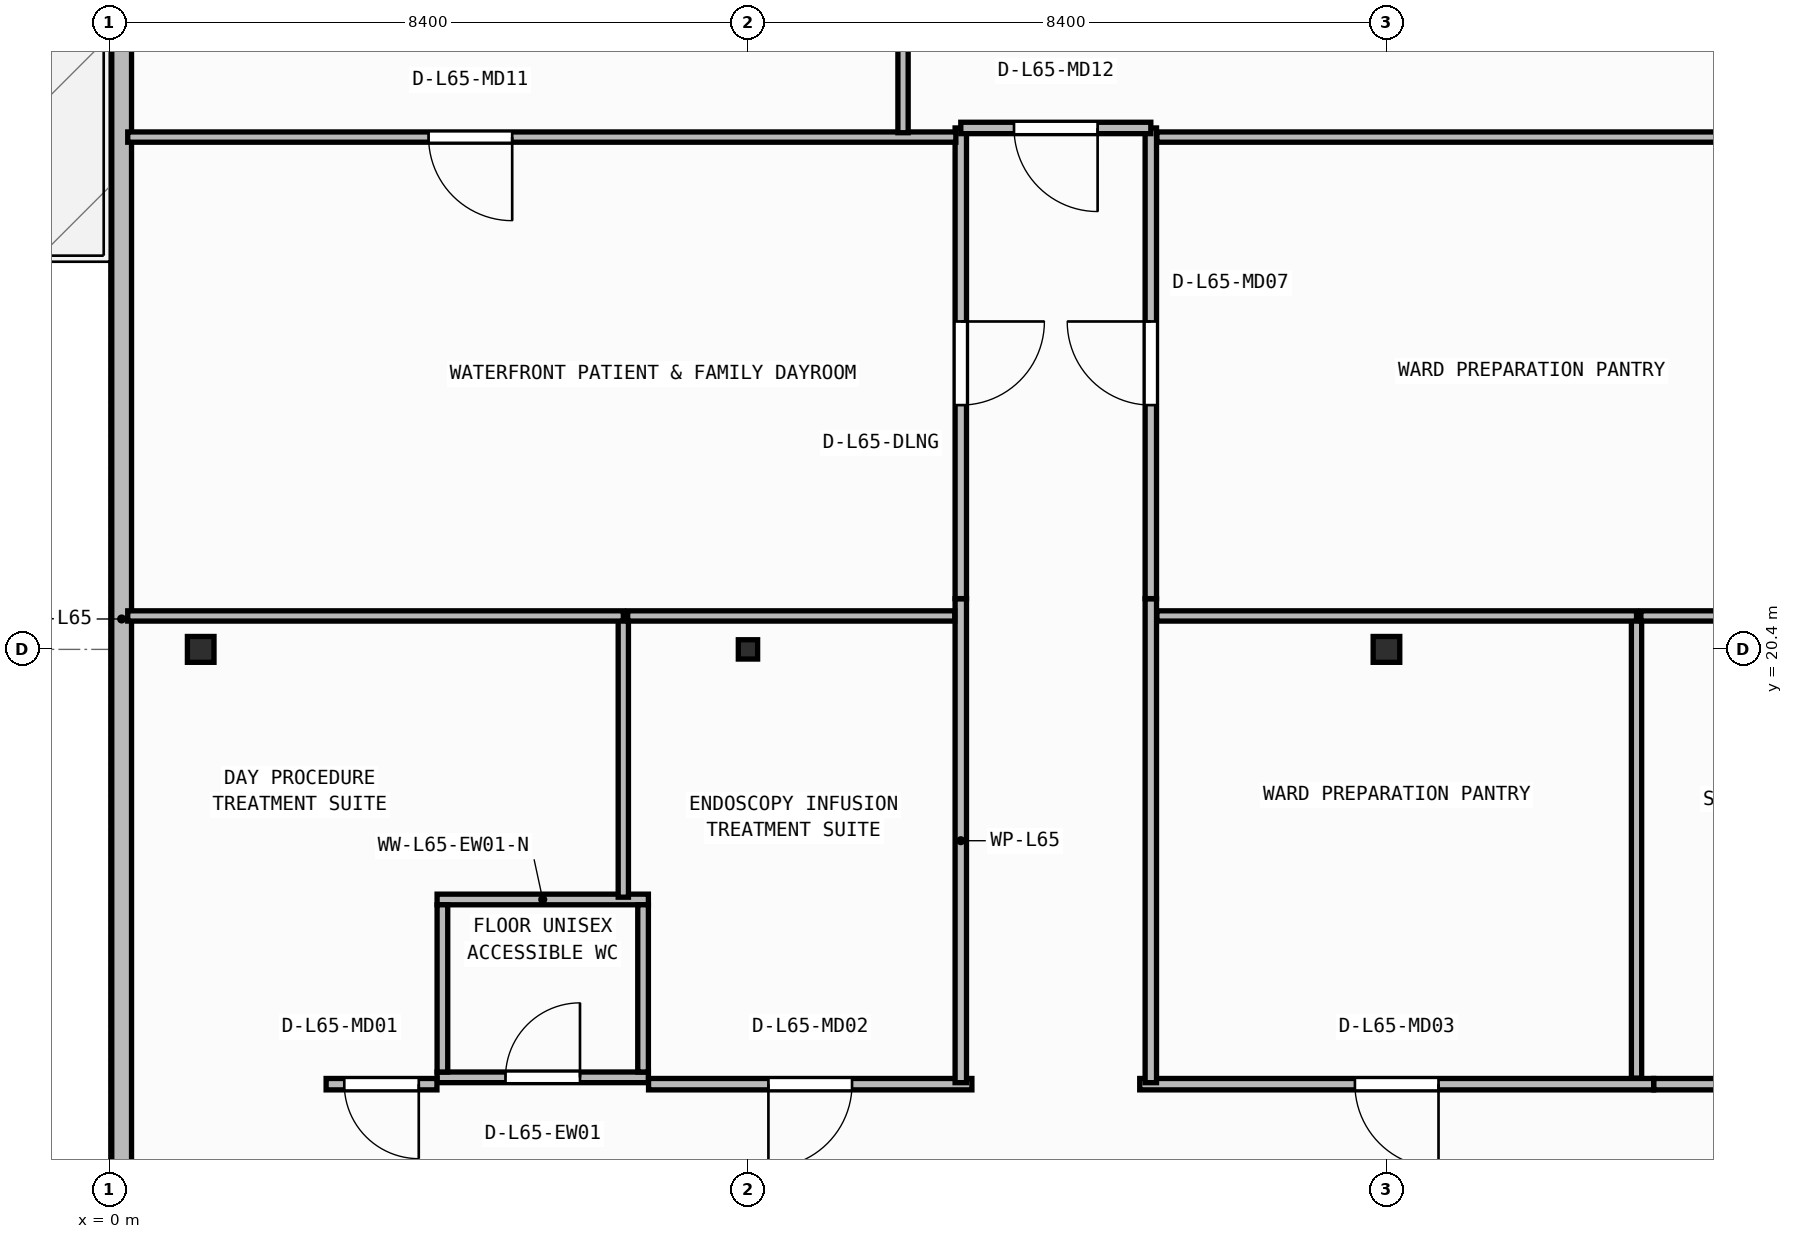
"""IFC4 building model, lengths in metres.
Left out: names, types, materials, properties, quantities, classifications, styles, units other than length and angle.
Written with IfcOpenShell. Run it as: python <this file> out.ifc"""

import sys

from ifc_helpers import new_model, si_unit, direction, frame, frame_2d, origin, origin_2d, place, context, subcontext, project, spatial, rectangle, i_section, extrude, element, fill, save


model = new_model("IFC4")
c1 = context("Model", 3, precision=1e-05, world=origin(), true_north=direction((0.0, 1.0)))
c2 = subcontext(c1, "Body", "Model", "MODEL_VIEW")
j1 = project(units=[si_unit("LENGTHUNIT", "METRE"), si_unit("PLANEANGLEUNIT", "RADIAN")], contexts=[c1])
p1 = place(None, origin())
s1 = spatial("IfcSite", under=j1, at=p1, CompositionType="ELEMENT")
p2 = place(p1, origin())
s2 = spatial("IfcBuilding", under=s1, at=p2, CompositionType="ELEMENT")
p3 = place(p2, frame((0.0, 0.0, 264.45)))
s3 = spatial("IfcBuildingStorey", under=s2, at=p3, CompositionType="ELEMENT", Elevation=264.45)
p4 = place(p3, frame((1.2, 20.4, 0.0), z_axis=(0.0, 0.0, 1.0), x_axis=(1.0, 0.0, 0.0)))
e1 = element("IfcColumn", 1, at=p4, inside=s3, PredefinedType="COLUMN", context=c2, shape_type="SweptSolid", body=[
    extrude(i_section(OverallWidth=0.35, OverallDepth=0.34, WebThickness=0.016, FlangeThickness=0.028, at=origin_2d()), origin(), (0.0, 0.0, 1.0), 3.95),
])
p5 = place(p3, frame((8.4, 20.4, 0.0), z_axis=(0.0, 0.0, 1.0), x_axis=(1.0, 0.0, 0.0)))
e2 = element("IfcColumn", 2, at=p5, inside=s3, PredefinedType="COLUMN", context=c2, shape_type="SweptSolid", body=[
    extrude(i_section(OverallWidth=0.254, OverallDepth=0.254, WebThickness=0.009, FlangeThickness=0.014, FilletRadius=0.013, at=origin_2d()), origin(), (0.0, 0.0, 1.0), 3.95),
])
p6 = place(p3, frame((16.8, 20.4, 0.0), z_axis=(0.0, 0.0, 1.0), x_axis=(1.0, 0.0, 0.0)))
e3 = element("IfcColumn", 3, at=p6, inside=s3, PredefinedType="COLUMN", context=c2, shape_type="SweptSolid", body=[
    extrude(i_section(OverallWidth=0.35, OverallDepth=0.34, WebThickness=0.016, FlangeThickness=0.028, at=origin_2d()), origin(), (0.0, 0.0, 1.0), 3.95),
])
p7 = place(p3, frame((0.16, 39.04, 0.0), z_axis=(0.0, 0.0, 1.0), x_axis=(0.0, -1.0, 0.0)))
e4 = element("IfcWall", 4, at=p7, inside=s3, PredefinedType="STANDARD", context=c2, shape_type="SweptSolid", body=[
    extrude(rectangle(XDim=36.48, YDim=0.26, at=frame_2d((18.24, 0.0))), origin(), (0.0, 0.0, 1.0), 3.71),
])
p8 = place(p7, frame((6.443, 0.0, 0.0)))
e5 = element("IfcOpeningElement", 5, at=p8, cuts=e4, PredefinedType="OPENING", context=c2, shape_type="SweptSolid", body=[
    extrude(rectangle(XDim=1.3, YDim=2.15, at=frame_2d((0.65, 1.075))), frame((0.0, 0.14, 0.0), z_axis=(0.0, -1.0, 0.0), x_axis=(1.0, 0.0, 0.0)), (0.0, 0.0, 1.0), 0.28),
])
p9 = place(p3, frame((4.31, 14.77, 0.0), z_axis=(0.0, 0.0, 1.0), x_axis=(1.0, 0.0, 0.0)))
e6 = element("IfcWall", 6, at=p9, inside=s3, PredefinedType="PARTITIONING", context=c2, shape_type="SweptSolid", body=[
    extrude(rectangle(XDim=2.78, YDim=0.14, at=frame_2d((1.39, 0.0))), origin(), (0.0, 0.0, 1.0), 3.71),
])
p10 = place(p9, frame((0.9, 0.0, 0.0)))
e7 = element("IfcOpeningElement", 7, at=p10, cuts=e6, PredefinedType="OPENING", context=c2, shape_type="SweptSolid", body=[
    extrude(rectangle(XDim=0.98, YDim=2.1, at=frame_2d((0.49, 1.05))), frame((0.0, 0.08, 0.0), z_axis=(0.0, -1.0, 0.0), x_axis=(1.0, 0.0, 0.0)), (0.0, 0.0, 1.0), 0.16),
])
p11 = place(p3, frame((4.31, 17.11, 0.0), z_axis=(0.0, 0.0, 1.0), x_axis=(1.0, 0.0, 0.0)))
e8 = element("IfcWall", 8, at=p11, inside=s3, PredefinedType="PARTITIONING", context=c2, shape_type="SweptSolid", body=[
    extrude(rectangle(XDim=2.78, YDim=0.14, at=frame_2d((1.39, 0.0))), origin(), (0.0, 0.0, 1.0), 3.71),
])
for number, where, z_axis, x_axis in (
    (9, (4.38, 14.84, 0.0), (0.0, 0.0, 1.0), (0.0, 1.0, 0.0)),
    (10, (7.02, 14.84, 0.0), (0.0, 0.0, 1.0), (0.0, 1.0, 0.0)),
):
    element("IfcWall", number, at=place(p3, frame(where, z_axis=z_axis, x_axis=x_axis)), inside=s3, PredefinedType="PARTITIONING", context=c2, shape_type="SweptSolid", body=[
        extrude(rectangle(XDim=2.2, YDim=0.14, at=frame_2d((1.1, 0.0))), origin(), (0.0, 0.0, 1.0), 3.71),
    ])
p12 = place(p3, frame((4.308, 14.68, 0.0), z_axis=(0.0, 0.0, 1.0), x_axis=(-1.0, 0.0, 0.0)))
e11 = element("IfcWall", 11, at=p12, inside=s3, PredefinedType="PARTITIONING", context=c2, shape_type="SweptSolid", body=[
    extrude(rectangle(XDim=1.458, YDim=0.15, at=frame_2d((0.729, 0.0))), origin(), (0.0, 0.0, 1.0), 3.71),
])
p13 = place(p12, frame((0.239, 0.0, 0.0)))
e12 = element("IfcOpeningElement", 12, at=p13, cuts=e11, PredefinedType="OPENING", context=c2, shape_type="SweptSolid", body=[
    extrude(rectangle(XDim=0.98, YDim=2.1, at=frame_2d((0.49, 1.05))), frame((0.0, 0.085, 0.0), z_axis=(0.0, -1.0, 0.0), x_axis=(1.0, 0.0, 0.0)), (0.0, 0.0, 1.0), 0.17),
])
p14 = place(p3, frame((11.346, 14.68, 0.0), z_axis=(0.0, 0.0, 1.0), x_axis=(-1.0, 0.0, 0.0)))
e13 = element("IfcWall", 13, at=p14, inside=s3, PredefinedType="PARTITIONING", context=c2, shape_type="SweptSolid", body=[
    extrude(rectangle(XDim=4.254, YDim=0.15, at=frame_2d((2.127, 0.0))), origin(), (0.0, 0.0, 1.0), 3.71),
])
p15 = place(p14, frame((1.577, 0.0, 0.0)))
e14 = element("IfcOpeningElement", 14, at=p15, cuts=e13, PredefinedType="OPENING", context=c2, shape_type="SweptSolid", body=[
    extrude(rectangle(XDim=1.1, YDim=2.1, at=frame_2d((0.55, 1.05))), frame((0.0, 0.085, 0.0), z_axis=(0.0, -1.0, 0.0), x_axis=(1.0, 0.0, 0.0)), (0.0, 0.0, 1.0), 0.17),
])
p16 = place(p3, frame((20.316, 14.68, 0.0), z_axis=(0.0, 0.0, 1.0), x_axis=(-1.0, 0.0, 0.0)))
e15 = element("IfcWall", 15, at=p16, inside=s3, PredefinedType="PARTITIONING", context=c2, shape_type="SweptSolid", body=[
    extrude(rectangle(XDim=6.762, YDim=0.15, at=frame_2d((3.381, 0.0))), origin(), (0.0, 0.0, 1.0), 3.71),
])
p17 = place(p16, frame((2.831, 0.0, 0.0)))
e16 = element("IfcOpeningElement", 16, at=p17, cuts=e15, PredefinedType="OPENING", context=c2, shape_type="SweptSolid", body=[
    extrude(rectangle(XDim=1.1, YDim=2.1, at=frame_2d((0.55, 1.05))), frame((0.0, 0.085, 0.0), z_axis=(0.0, -1.0, 0.0), x_axis=(1.0, 0.0, 0.0)), (0.0, 0.0, 1.0), 0.17),
])
p18 = place(p3, frame((28.036, 14.68, 0.0), z_axis=(0.0, 0.0, 1.0), x_axis=(-1.0, 0.0, 0.0)))
e17 = element("IfcWall", 17, at=p18, inside=s3, PredefinedType="PARTITIONING", context=c2, shape_type="SweptSolid", body=[
    extrude(rectangle(XDim=7.718, YDim=0.15, at=frame_2d((3.859, 0.0))), origin(), (0.0, 0.0, 1.0), 3.71),
])
p19 = place(p18, frame((3.309, 0.0, 0.0)))
e18 = element("IfcOpeningElement", 18, at=p19, cuts=e17, PredefinedType="OPENING", context=c2, shape_type="SweptSolid", body=[
    extrude(rectangle(XDim=1.1, YDim=2.1, at=frame_2d((0.55, 1.05))), frame((0.0, 0.085, 0.0), z_axis=(0.0, -1.0, 0.0), x_axis=(1.0, 0.0, 0.0)), (0.0, 0.0, 1.0), 0.17),
])
for number, where, z_axis, x_axis in (
    (19, (11.2, 21.066, 0.0), (0.0, 0.0, 1.0), (0.0, -1.0, 0.0)),
    (20, (13.7, 14.7, 0.0), (0.0, 0.0, 1.0), (0.0, 1.0, 0.0)),
):
    element("IfcWall", number, at=place(p3, frame(where, z_axis=z_axis, x_axis=x_axis)), inside=s3, PredefinedType="PARTITIONING", context=c2, shape_type="SweptSolid", body=[
        extrude(rectangle(XDim=6.366, YDim=0.15, at=frame_2d((3.183, 0.0))), origin(), (0.0, 0.0, 1.0), 3.71),
    ])
p20 = place(p3, frame((11.2, 27.26, 0.0), z_axis=(0.0, 0.0, 1.0), x_axis=(0.0, -1.0, 0.0)))
e21 = element("IfcWall", 21, at=p20, inside=s3, PredefinedType="PARTITIONING", context=c2, shape_type="SweptSolid", body=[
    extrude(rectangle(XDim=6.192, YDim=0.15, at=frame_2d((3.096, 0.0))), origin(), (0.0, 0.0, 1.0), 3.71),
])
p21 = place(p20, frame((2.546, 0.0, 0.0)))
e22 = element("IfcOpeningElement", 22, at=p21, cuts=e21, PredefinedType="OPENING", context=c2, shape_type="SweptSolid", body=[
    extrude(rectangle(XDim=1.1, YDim=2.1, at=frame_2d((0.55, 1.05))), frame((0.0, 0.085, 0.0), z_axis=(0.0, -1.0, 0.0), x_axis=(1.0, 0.0, 0.0)), (0.0, 0.0, 1.0), 0.17),
])
p22 = place(p3, frame((13.7, 21.068, 0.0), z_axis=(0.0, 0.0, 1.0), x_axis=(0.0, 1.0, 0.0)))
e23 = element("IfcWall", 23, at=p22, inside=s3, PredefinedType="PARTITIONING", context=c2, shape_type="SweptSolid", body=[
    extrude(rectangle(XDim=6.192, YDim=0.15, at=frame_2d((3.096, 0.0))), origin(), (0.0, 0.0, 1.0), 3.71),
])
p23 = place(p22, frame((2.546, 0.0, 0.0)))
e24 = element("IfcOpeningElement", 24, at=p23, cuts=e23, PredefinedType="OPENING", context=c2, shape_type="SweptSolid", body=[
    extrude(rectangle(XDim=1.1, YDim=2.1, at=frame_2d((0.55, 1.05))), frame((0.0, 0.085, 0.0), z_axis=(0.0, -1.0, 0.0), x_axis=(1.0, 0.0, 0.0)), (0.0, 0.0, 1.0), 0.17),
])
p24 = place(p3, frame((13.7, 27.26, 0.0), z_axis=(0.0, 0.0, 1.0), x_axis=(-1.0, 0.0, 0.0)))
e25 = element("IfcWall", 25, at=p24, inside=s3, PredefinedType="PARTITIONING", context=c2, shape_type="SweptSolid", body=[
    extrude(rectangle(XDim=2.5, YDim=0.15, at=frame_2d((1.25, 0.0))), origin(), (0.0, 0.0, 1.0), 3.71),
])
p25 = place(p24, frame((0.7, 0.0, 0.0)))
e26 = element("IfcOpeningElement", 26, at=p25, cuts=e25, PredefinedType="OPENING", context=c2, shape_type="SweptSolid", body=[
    extrude(rectangle(XDim=1.1, YDim=2.1, at=frame_2d((0.55, 1.05))), frame((0.0, 0.085, 0.0), z_axis=(0.0, -1.0, 0.0), x_axis=(1.0, 0.0, 0.0)), (0.0, 0.0, 1.0), 0.17),
])
p26 = place(p3, frame((6.76, 17.14, 0.0), z_axis=(0.0, 0.0, 1.0), x_axis=(0.0, 1.0, 0.0)))
e27 = element("IfcWall", 27, at=p26, inside=s3, PredefinedType="PARTITIONING", context=c2, shape_type="SweptSolid", body=[
    extrude(rectangle(XDim=3.7, YDim=0.135, at=frame_2d((1.85, 0.0))), origin(), (0.0, 0.0, 1.0), 3.71),
])
p27 = place(p3, frame((6.76, 20.84, 0.0), z_axis=(0.0, 0.0, 1.0), x_axis=(-1.0, 0.0, 0.0)))
e28 = element("IfcWall", 28, at=p27, inside=s3, PredefinedType="PARTITIONING", context=c2, shape_type="SweptSolid", body=[
    extrude(rectangle(XDim=6.52, YDim=0.135, at=frame_2d((3.26, 0.0))), origin(), (0.0, 0.0, 1.0), 3.157),
])
p28 = place(p3, frame((11.12, 20.84, 0.0), z_axis=(0.0, 0.0, 1.0), x_axis=(-1.0, 0.0, 0.0)))
e29 = element("IfcWall", 29, at=p28, inside=s3, PredefinedType="PARTITIONING", context=c2, shape_type="SweptSolid", body=[
    extrude(rectangle(XDim=4.303, YDim=0.135, at=frame_2d((2.151, 0.0))), origin(), (0.0, 0.0, 1.0), 3.157),
])
p29 = place(p3, frame((20.09, 14.76, 0.0), z_axis=(0.0, 0.0, 1.0), x_axis=(0.0, 1.0, 0.0)))
e30 = element("IfcWall", 30, at=p29, inside=s3, PredefinedType="PARTITIONING", context=c2, shape_type="SweptSolid", body=[
    extrude(rectangle(XDim=6.08, YDim=0.135, at=frame_2d((3.04, 0.0))), origin(), (0.0, 0.0, 1.0), 3.71),
])
p30 = place(p3, frame((20.09, 20.84, 0.0), z_axis=(0.0, 0.0, 1.0), x_axis=(-1.0, 0.0, 0.0)))
e31 = element("IfcWall", 31, at=p30, inside=s3, PredefinedType="PARTITIONING", context=c2, shape_type="SweptSolid", body=[
    extrude(rectangle(XDim=6.31, YDim=0.135, at=frame_2d((3.155, 0.0))), origin(), (0.0, 0.0, 1.0), 3.157),
])
p31 = place(p3, frame((23.847, 20.84, 0.0), z_axis=(0.0, 0.0, 1.0), x_axis=(-1.0, 0.0, 0.0)))
e32 = element("IfcWall", 32, at=p31, inside=s3, PredefinedType="PARTITIONING", context=c2, shape_type="SweptSolid", body=[
    extrude(rectangle(XDim=3.7, YDim=0.135, at=frame_2d((1.85, 0.0))), origin(), (0.0, 0.0, 1.0), 3.157),
])
p32 = place(p3, frame((11.135, 27.14, 0.0), z_axis=(0.0, 0.0, 1.0), x_axis=(-1.0, 0.0, 0.0)))
e33 = element("IfcWall", 33, at=p32, inside=s3, PredefinedType="PARTITIONING", context=c2, shape_type="SweptSolid", body=[
    extrude(rectangle(XDim=10.895, YDim=0.135, at=frame_2d((5.448, 0.0))), origin(), (0.0, 0.0, 1.0), 3.71),
])
p33 = place(p32, frame((5.837, 0.0, 0.0)))
e34 = element("IfcOpeningElement", 34, at=p33, cuts=e33, PredefinedType="OPENING", context=c2, shape_type="SweptSolid", body=[
    extrude(rectangle(XDim=1.1, YDim=2.1, at=frame_2d((0.55, 1.05))), frame((0.0, 0.077, 0.0), z_axis=(0.0, -1.0, 0.0), x_axis=(1.0, 0.0, 0.0)), (0.0, 0.0, 1.0), 0.155),
])
p34 = place(p3, frame((23.64, 27.14, 0.0), z_axis=(0.0, 0.0, 1.0), x_axis=(-1.0, 0.0, 0.0)))
e35 = element("IfcWall", 35, at=p34, inside=s3, PredefinedType="PARTITIONING", context=c2, shape_type="SweptSolid", body=[
    extrude(rectangle(XDim=9.86, YDim=0.135, at=frame_2d((4.93, 0.0))), origin(), (0.0, 0.0, 1.0), 3.71),
])
p35 = place(p3, frame((10.44, 27.198, 0.0), z_axis=(0.0, 0.0, 1.0), x_axis=(0.0, 1.0, 0.0)))
e36 = element("IfcWall", 36, at=p35, inside=s3, PredefinedType="PARTITIONING", context=c2, shape_type="SweptSolid", body=[
    extrude(rectangle(XDim=8.385, YDim=0.135, at=frame_2d((4.193, 0.0))), origin(), (0.0, 0.0, 1.0), 3.71),
])
p36 = place(p10, origin())
e37 = element("IfcDoor", 37, at=p36, inside=s3, OperationType="SINGLE_SWING_RIGHT", PredefinedType="DOOR", context=c2, shape_type="SweptSolid", body=[
    extrude(rectangle(XDim=0.98, YDim=2.1, at=frame_2d((0.49, 1.05))), frame((0.0, 0.025, 0.0), z_axis=(0.0, -1.0, 0.0), x_axis=(1.0, 0.0, 0.0)), (0.0, 0.0, 1.0), 0.05),
])
fill(e7, e37)
p37 = place(p13, origin())
e38 = element("IfcDoor", 38, at=p37, inside=s3, OperationType="SINGLE_SWING_LEFT", PredefinedType="DOOR", context=c2, shape_type="SweptSolid", body=[
    extrude(rectangle(XDim=0.98, YDim=2.1, at=frame_2d((0.49, 1.05))), frame((0.0, 0.025, 0.0), z_axis=(0.0, -1.0, 0.0), x_axis=(1.0, 0.0, 0.0)), (0.0, 0.0, 1.0), 0.05),
])
fill(e12, e38)
p38 = place(p15, origin())
e39 = element("IfcDoor", 39, at=p38, inside=s3, OperationType="SINGLE_SWING_RIGHT", PredefinedType="DOOR", context=c2, shape_type="SweptSolid", body=[
    extrude(rectangle(XDim=1.1, YDim=2.1, at=frame_2d((0.55, 1.05))), frame((0.0, 0.025, 0.0), z_axis=(0.0, -1.0, 0.0), x_axis=(1.0, 0.0, 0.0)), (0.0, 0.0, 1.0), 0.05),
])
fill(e14, e39)
p39 = place(p17, origin())
e40 = element("IfcDoor", 40, at=p39, inside=s3, OperationType="SINGLE_SWING_LEFT", PredefinedType="DOOR", context=c2, shape_type="SweptSolid", body=[
    extrude(rectangle(XDim=1.1, YDim=2.1, at=frame_2d((0.55, 1.05))), frame((0.0, 0.025, 0.0), z_axis=(0.0, -1.0, 0.0), x_axis=(1.0, 0.0, 0.0)), (0.0, 0.0, 1.0), 0.05),
])
fill(e16, e40)
p40 = place(p21, origin())
e41 = element("IfcDoor", 41, at=p40, inside=s3, OperationType="SINGLE_SWING_LEFT", PredefinedType="DOOR", context=c2, shape_type="SweptSolid", body=[
    extrude(rectangle(XDim=1.1, YDim=2.1, at=frame_2d((0.55, 1.05))), frame((0.0, 0.025, 0.0), z_axis=(0.0, -1.0, 0.0), x_axis=(1.0, 0.0, 0.0)), (0.0, 0.0, 1.0), 0.05),
])
fill(e22, e41)
p41 = place(p23, origin())
e42 = element("IfcDoor", 42, at=p41, inside=s3, OperationType="SINGLE_SWING_RIGHT", PredefinedType="DOOR", context=c2, shape_type="SweptSolid", body=[
    extrude(rectangle(XDim=1.1, YDim=2.1, at=frame_2d((0.55, 1.05))), frame((0.0, 0.025, 0.0), z_axis=(0.0, -1.0, 0.0), x_axis=(1.0, 0.0, 0.0)), (0.0, 0.0, 1.0), 0.05),
])
fill(e24, e42)
p42 = place(p25, origin())
e43 = element("IfcDoor", 43, at=p42, inside=s3, OperationType="SINGLE_SWING_LEFT", PredefinedType="DOOR", context=c2, shape_type="SweptSolid", body=[
    extrude(rectangle(XDim=1.1, YDim=2.1, at=frame_2d((0.55, 1.05))), frame((0.0, 0.025, 0.0), z_axis=(0.0, -1.0, 0.0), x_axis=(1.0, 0.0, 0.0)), (0.0, 0.0, 1.0), 0.05),
])
fill(e26, e43)
p43 = place(p33, origin())
e44 = element("IfcDoor", 44, at=p43, inside=s3, OperationType="SINGLE_SWING_LEFT", PredefinedType="DOOR", context=c2, shape_type="SweptSolid", body=[
    extrude(rectangle(XDim=1.1, YDim=2.1, at=frame_2d((0.55, 1.05))), frame((0.0, 0.025, 0.0), z_axis=(0.0, -1.0, 0.0), x_axis=(1.0, 0.0, 0.0)), (0.0, 0.0, 1.0), 0.05),
])
fill(e34, e44)
save(model, sys.argv[1])
